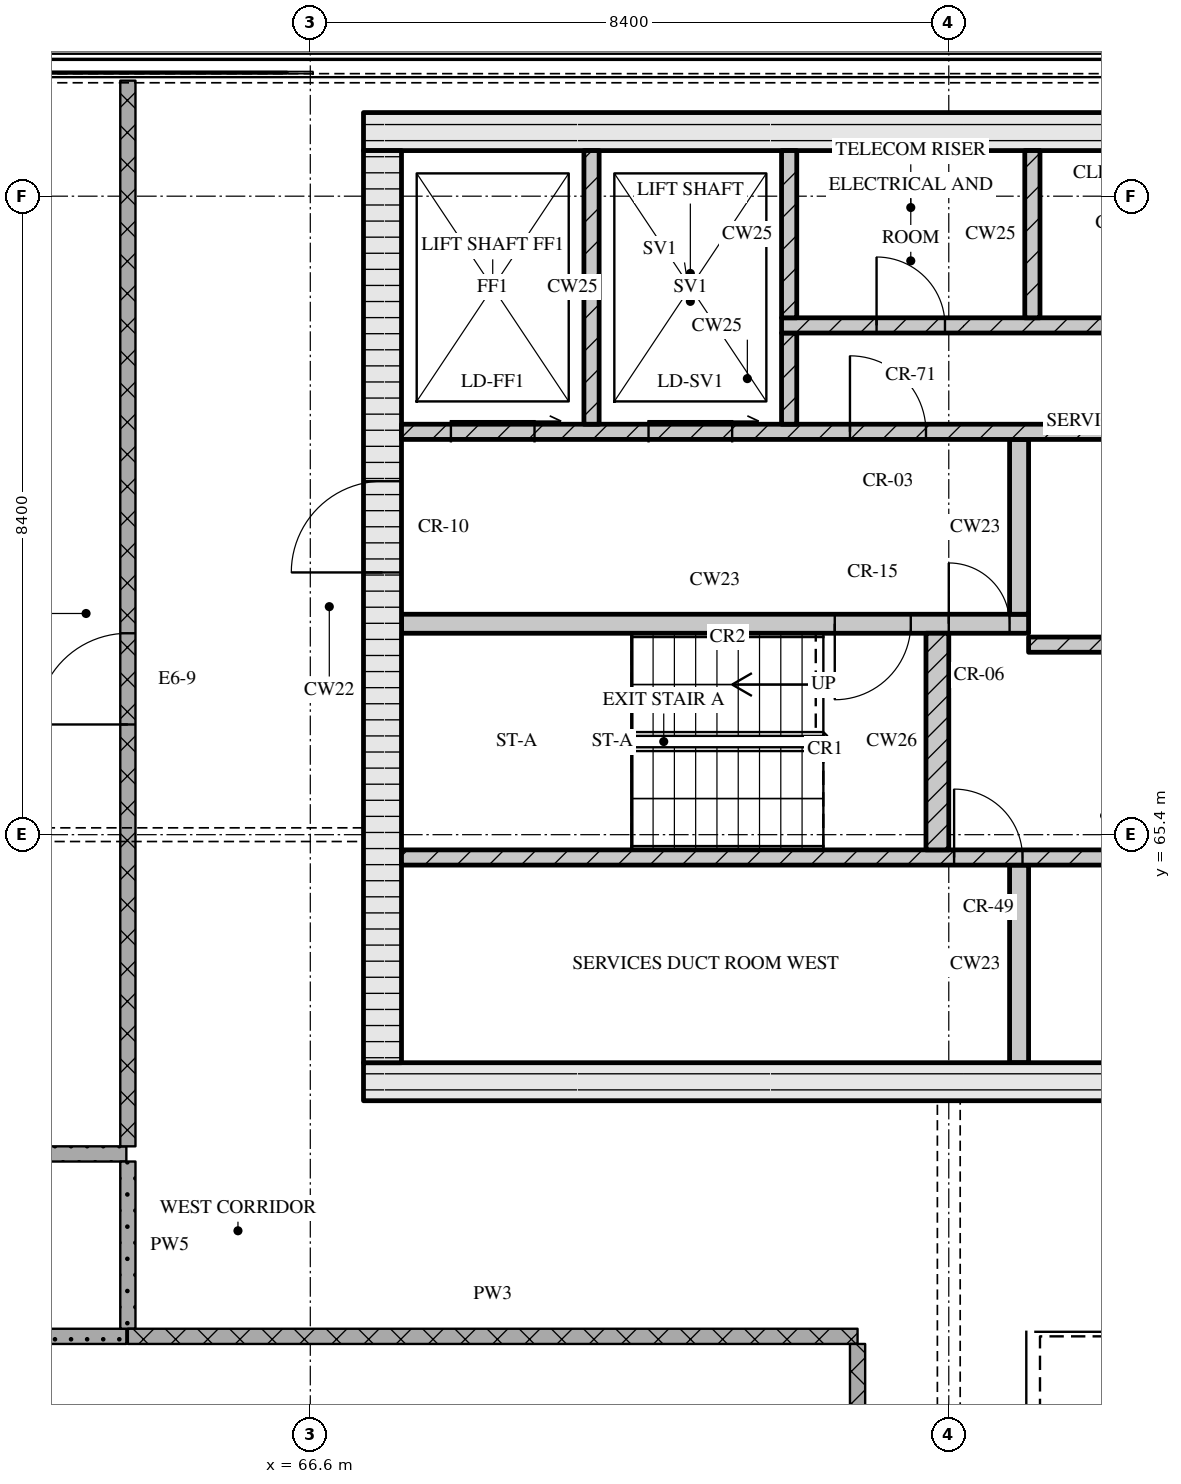
"""IFC4 building model, lengths in metres.
Left out: names, types, materials, properties, quantities, classifications, styles, units other than length and angle.
Written with IfcOpenShell. Run it as: python <this file> out.ifc"""

import sys

from ifc_helpers import new_model, si_unit, direction, frame, frame_2d, origin, place, context, subcontext, project, spatial, rectangle, extrude, element, fill, save


model = new_model("IFC4")
c1 = context("Model", 3, precision=1e-05, world=origin(), true_north=direction((0.0, 1.0)))
c2 = subcontext(c1, "Body", "Model", "MODEL_VIEW")
j1 = project(units=[si_unit("LENGTHUNIT", "METRE"), si_unit("PLANEANGLEUNIT", "RADIAN")], contexts=[c1])
p1 = place(None, origin())
s1 = spatial("IfcSite", under=j1, at=p1, CompositionType="ELEMENT")
p2 = place(p1, origin())
s2 = spatial("IfcBuilding", under=s1, at=p2, CompositionType="ELEMENT")
p3 = place(p2, frame((0.0, 0.0, 303.15)))
s3 = spatial("IfcBuildingStorey", under=s2, at=p3, CompositionType="ELEMENT", Elevation=303.15)
p4 = place(p3, frame((67.3, 62.15, 0.0), z_axis=(0.0, 0.0, 1.0), x_axis=(1.0, 0.0, 0.0)))
e1 = element("IfcWall", 1, at=p4, inside=s3, PredefinedType="SOLIDWALL", context=c2, shape_type="SweptSolid", body=[
    extrude(rectangle(XDim=40.6, YDim=0.5, at=frame_2d((20.3, 0.0))), origin(), (0.0, 0.0, 1.0), 3.32),
])
p5 = place(p4, frame((20.65, 0.0, 0.0)))
e2 = element("IfcOpeningElement", 2, at=p5, cuts=e1, PredefinedType="OPENING", context=c2, shape_type="SweptSolid", body=[
    extrude(rectangle(XDim=1.8, YDim=2.1, at=frame_2d((0.9, 1.05))), frame((0.0, 0.26, 0.0), z_axis=(0.0, -1.0, 0.0), x_axis=(1.0, 0.0, 0.0)), (0.0, 0.0, 1.0), 0.52),
])
p6 = place(p3, frame((67.3, 74.65, 0.0), z_axis=(0.0, 0.0, 1.0), x_axis=(1.0, 0.0, 0.0)))
e3 = element("IfcWall", 3, at=p6, inside=s3, PredefinedType="SOLIDWALL", context=c2, shape_type="SweptSolid", body=[
    extrude(rectangle(XDim=40.6, YDim=0.5, at=frame_2d((20.3, 0.0))), origin(), (0.0, 0.0, 1.0), 3.32),
])
p7 = place(p3, frame((67.55, 62.4, 0.0), z_axis=(0.0, 0.0, 1.0), x_axis=(0.0, 1.0, 0.0)))
e4 = element("IfcWall", 4, at=p7, inside=s3, PredefinedType="SOLIDWALL", context=c2, shape_type="SweptSolid", body=[
    extrude(rectangle(XDim=12.0, YDim=0.5, at=frame_2d((6.0, 0.0))), origin(), (0.0, 0.0, 1.0), 3.32),
])
p8 = place(p7, frame((6.45, 0.0, 0.0)))
e5 = element("IfcOpeningElement", 5, at=p8, cuts=e4, PredefinedType="OPENING", context=c2, shape_type="SweptSolid", body=[
    extrude(rectangle(XDim=1.2, YDim=2.1, at=frame_2d((0.6, 1.05))), frame((0.0, 0.26, 0.0), z_axis=(0.0, -1.0, 0.0), x_axis=(1.0, 0.0, 0.0)), (0.0, 0.0, 1.0), 0.52),
])
p9 = place(p3, frame((75.925, 62.4, 0.0), z_axis=(0.0, 0.0, 1.0), x_axis=(0.0, 1.0, 0.0)))
e6 = element("IfcWall", 6, at=p9, inside=s3, PredefinedType="SOLIDWALL", context=c2, shape_type="SweptSolid", body=[
    extrude(rectangle(XDim=2.6, YDim=0.25, at=frame_2d((1.3, 0.0))), origin(), (0.0, 0.0, 1.0), 3.32),
])
p10 = place(p3, frame((67.8, 65.1, 0.0), z_axis=(0.0, 0.0, 1.0), x_axis=(1.0, 0.0, 0.0)))
e7 = element("IfcWall", 7, at=p10, inside=s3, PredefinedType="SOLIDWALL", context=c2, shape_type="SweptSolid", body=[
    extrude(rectangle(XDim=18.5, YDim=0.2, at=frame_2d((9.25, 0.0))), origin(), (0.0, 0.0, 1.0), 3.32),
])
p11 = place(p10, frame((7.27, 0.0, 0.0)))
e8 = element("IfcOpeningElement", 8, at=p11, cuts=e7, PredefinedType="OPENING", context=c2, shape_type="SweptSolid", body=[
    extrude(rectangle(XDim=0.9, YDim=2.1, at=frame_2d((0.45, 1.05))), frame((0.0, 0.11, 0.0), z_axis=(0.0, -1.0, 0.0), x_axis=(1.0, 0.0, 0.0)), (0.0, 0.0, 1.0), 0.22),
])
p12 = place(p10, frame((11.45, 0.0, 0.0)))
e9 = element("IfcOpeningElement", 9, at=p12, cuts=e7, PredefinedType="OPENING", context=c2, shape_type="SweptSolid", body=[
    extrude(rectangle(XDim=0.9, YDim=2.1, at=frame_2d((0.45, 1.05))), frame((0.0, 0.11, 0.0), z_axis=(0.0, -1.0, 0.0), x_axis=(1.0, 0.0, 0.0)), (0.0, 0.0, 1.0), 0.22),
])
p13 = place(p10, frame((16.7, 0.0, 0.0)))
e10 = element("IfcOpeningElement", 10, at=p13, cuts=e7, PredefinedType="OPENING", context=c2, shape_type="SweptSolid", body=[
    extrude(rectangle(XDim=0.9, YDim=2.1, at=frame_2d((0.45, 1.05))), frame((0.0, 0.11, 0.0), z_axis=(0.0, -1.0, 0.0), x_axis=(1.0, 0.0, 0.0)), (0.0, 0.0, 1.0), 0.22),
])
p14 = place(p3, frame((74.85, 65.2, 0.0), z_axis=(0.0, 0.0, 1.0), x_axis=(0.0, 1.0, 0.0)))
e11 = element("IfcWall", 11, at=p14, inside=s3, PredefinedType="SOLIDWALL", context=c2, shape_type="SweptSolid", body=[
    extrude(rectangle(XDim=2.85, YDim=0.3, at=frame_2d((1.425, 0.0))), origin(), (0.0, 0.0, 1.0), 3.32),
])
p15 = place(p3, frame((76.05, 67.9, 0.0), z_axis=(0.0, 0.0, 1.0), x_axis=(1.0, 0.0, 0.0)))
e12 = element("IfcWall", 12, at=p15, inside=s3, PredefinedType="SOLIDWALL", context=c2, shape_type="SweptSolid", body=[
    extrude(rectangle(XDim=23.1, YDim=0.2, at=frame_2d((11.55, 0.0))), origin(), (0.0, 0.0, 1.0), 3.32),
])
p16 = place(p15, frame((1.4, 0.0, 0.0)))
e13 = element("IfcOpeningElement", 13, at=p16, cuts=e12, PredefinedType="OPENING", context=c2, shape_type="SweptSolid", body=[
    extrude(rectangle(XDim=0.9, YDim=2.1, at=frame_2d((0.45, 1.05))), frame((0.0, 0.11, 0.0), z_axis=(0.0, -1.0, 0.0), x_axis=(1.0, 0.0, 0.0)), (0.0, 0.0, 1.0), 0.22),
])
p17 = place(p15, frame((5.11, 0.0, 0.0)))
e14 = element("IfcOpeningElement", 14, at=p17, cuts=e12, PredefinedType="OPENING", context=c2, shape_type="SweptSolid", body=[
    extrude(rectangle(XDim=0.9, YDim=2.1, at=frame_2d((0.45, 1.05))), frame((0.0, 0.11, 0.0), z_axis=(0.0, -1.0, 0.0), x_axis=(1.0, 0.0, 0.0)), (0.0, 0.0, 1.0), 0.22),
])
p18 = place(p15, frame((8.45, 0.0, 0.0)))
e15 = element("IfcOpeningElement", 15, at=p18, cuts=e12, PredefinedType="OPENING", context=c2, shape_type="SweptSolid", body=[
    extrude(rectangle(XDim=0.9, YDim=2.1, at=frame_2d((0.45, 1.05))), frame((0.0, 0.11, 0.0), z_axis=(0.0, -1.0, 0.0), x_axis=(1.0, 0.0, 0.0)), (0.0, 0.0, 1.0), 0.22),
])
p19 = place(p15, frame((10.91, 0.0, 0.0)))
e16 = element("IfcOpeningElement", 16, at=p19, cuts=e12, PredefinedType="OPENING", context=c2, shape_type="SweptSolid", body=[
    extrude(rectangle(XDim=0.9, YDim=2.1, at=frame_2d((0.45, 1.05))), frame((0.0, 0.11, 0.0), z_axis=(0.0, -1.0, 0.0), x_axis=(1.0, 0.0, 0.0)), (0.0, 0.0, 1.0), 0.22),
])
p20 = place(p15, frame((13.55, 0.0, 0.0)))
e17 = element("IfcOpeningElement", 17, at=p20, cuts=e12, PredefinedType="OPENING", context=c2, shape_type="SweptSolid", body=[
    extrude(rectangle(XDim=1.0, YDim=2.1, at=frame_2d((0.5, 1.05))), frame((0.0, 0.11, 0.0), z_axis=(0.0, -1.0, 0.0), x_axis=(1.0, 0.0, 0.0)), (0.0, 0.0, 1.0), 0.22),
])
p21 = place(p15, frame((16.2, 0.0, 0.0)))
e18 = element("IfcOpeningElement", 18, at=p21, cuts=e12, PredefinedType="OPENING", context=c2, shape_type="SweptSolid", body=[
    extrude(rectangle(XDim=1.1, YDim=2.1, at=frame_2d((0.55, 1.05))), frame((0.0, 0.11, 0.0), z_axis=(0.0, -1.0, 0.0), x_axis=(1.0, 0.0, 0.0)), (0.0, 0.0, 1.0), 0.22),
])
p22 = place(p15, frame((18.7, 0.0, 0.0)))
e19 = element("IfcOpeningElement", 19, at=p22, cuts=e12, PredefinedType="OPENING", context=c2, shape_type="SweptSolid", body=[
    extrude(rectangle(XDim=1.1, YDim=2.1, at=frame_2d((0.55, 1.05))), frame((0.0, 0.11, 0.0), z_axis=(0.0, -1.0, 0.0), x_axis=(1.0, 0.0, 0.0)), (0.0, 0.0, 1.0), 0.22),
])
p23 = place(p15, frame((21.2, 0.0, 0.0)))
e20 = element("IfcOpeningElement", 20, at=p23, cuts=e12, PredefinedType="OPENING", context=c2, shape_type="SweptSolid", body=[
    extrude(rectangle(XDim=1.1, YDim=2.1, at=frame_2d((0.55, 1.05))), frame((0.0, 0.11, 0.0), z_axis=(0.0, -1.0, 0.0), x_axis=(1.0, 0.0, 0.0)), (0.0, 0.0, 1.0), 0.22),
])
p24 = place(p3, frame((67.8, 68.175, 0.0), z_axis=(0.0, 0.0, 1.0), x_axis=(1.0, 0.0, 0.0)))
e21 = element("IfcWall", 21, at=p24, inside=s3, PredefinedType="SOLIDWALL", context=c2, shape_type="SweptSolid", body=[
    extrude(rectangle(XDim=8.25, YDim=0.25, at=frame_2d((4.125, 0.0))), origin(), (0.0, 0.0, 1.0), 3.32),
])
p25 = place(p24, frame((5.7, 0.0, 0.0)))
e22 = element("IfcOpeningElement", 22, at=p25, cuts=e21, PredefinedType="OPENING", context=c2, shape_type="SweptSolid", body=[
    extrude(rectangle(XDim=1.0, YDim=2.1, at=frame_2d((0.5, 1.05))), frame((0.0, 0.135, 0.0), z_axis=(0.0, -1.0, 0.0), x_axis=(1.0, 0.0, 0.0)), (0.0, 0.0, 1.0), 0.27),
])
p26 = place(p24, frame((7.2, 0.0, 0.0)))
e23 = element("IfcOpeningElement", 23, at=p26, cuts=e21, PredefinedType="OPENING", context=c2, shape_type="SweptSolid", body=[
    extrude(rectangle(XDim=0.8, YDim=2.1, at=frame_2d((0.4, 1.05))), frame((0.0, 0.135, 0.0), z_axis=(0.0, -1.0, 0.0), x_axis=(1.0, 0.0, 0.0)), (0.0, 0.0, 1.0), 0.27),
])
p27 = place(p3, frame((75.925, 68.3, 0.0), z_axis=(0.0, 0.0, 1.0), x_axis=(0.0, 1.0, 0.0)))
e24 = element("IfcWall", 24, at=p27, inside=s3, PredefinedType="SOLIDWALL", context=c2, shape_type="SweptSolid", body=[
    extrude(rectangle(XDim=2.3, YDim=0.25, at=frame_2d((1.15, 0.0))), origin(), (0.0, 0.0, 1.0), 3.32),
])
p28 = place(p3, frame((67.8, 70.7, 0.0), z_axis=(0.0, 0.0, 1.0), x_axis=(1.0, 0.0, 0.0)))
e25 = element("IfcWall", 25, at=p28, inside=s3, PredefinedType="SOLIDWALL", context=c2, shape_type="SweptSolid", body=[
    extrude(rectangle(XDim=39.6, YDim=0.2, at=frame_2d((19.8, 0.0))), origin(), (0.0, 0.0, 1.0), 3.32),
])
p29 = place(p28, frame((0.65, 0.0, 0.0)))
e26 = element("IfcOpeningElement", 26, at=p29, cuts=e25, PredefinedType="OPENING", context=c2, shape_type="SweptSolid", body=[
    extrude(rectangle(XDim=1.1, YDim=2.1, at=frame_2d((0.55, 1.05))), frame((0.0, 0.11, 0.0), z_axis=(0.0, -1.0, 0.0), x_axis=(1.0, 0.0, 0.0)), (0.0, 0.0, 1.0), 0.22),
])
p30 = place(p28, frame((3.25, 0.0, 0.0)))
e27 = element("IfcOpeningElement", 27, at=p30, cuts=e25, PredefinedType="OPENING", context=c2, shape_type="SweptSolid", body=[
    extrude(rectangle(XDim=1.1, YDim=2.1, at=frame_2d((0.55, 1.05))), frame((0.0, 0.11, 0.0), z_axis=(0.0, -1.0, 0.0), x_axis=(1.0, 0.0, 0.0)), (0.0, 0.0, 1.0), 0.22),
])
p31 = place(p28, frame((5.9, 0.0, 0.0)))
e28 = element("IfcOpeningElement", 28, at=p31, cuts=e25, PredefinedType="OPENING", context=c2, shape_type="SweptSolid", body=[
    extrude(rectangle(XDim=1.0, YDim=2.1, at=frame_2d((0.5, 1.05))), frame((0.0, 0.11, 0.0), z_axis=(0.0, -1.0, 0.0), x_axis=(1.0, 0.0, 0.0)), (0.0, 0.0, 1.0), 0.22),
])
p32 = place(p28, frame((21.7, 0.0, 0.0)))
e29 = element("IfcOpeningElement", 29, at=p32, cuts=e25, PredefinedType="OPENING", context=c2, shape_type="SweptSolid", body=[
    extrude(rectangle(XDim=1.0, YDim=2.1, at=frame_2d((0.5, 1.05))), frame((0.0, 0.11, 0.0), z_axis=(0.0, -1.0, 0.0), x_axis=(1.0, 0.0, 0.0)), (0.0, 0.0, 1.0), 0.22),
])
p33 = place(p28, frame((32.7, 0.0, 0.0)))
e30 = element("IfcOpeningElement", 30, at=p33, cuts=e25, PredefinedType="OPENING", context=c2, shape_type="SweptSolid", body=[
    extrude(rectangle(XDim=1.0, YDim=2.1, at=frame_2d((0.5, 1.05))), frame((0.0, 0.11, 0.0), z_axis=(0.0, -1.0, 0.0), x_axis=(1.0, 0.0, 0.0)), (0.0, 0.0, 1.0), 0.22),
])
p34 = place(p28, frame((35.25, 0.0, 0.0)))
e31 = element("IfcOpeningElement", 31, at=p34, cuts=e25, PredefinedType="OPENING", context=c2, shape_type="SweptSolid", body=[
    extrude(rectangle(XDim=1.1, YDim=2.1, at=frame_2d((0.55, 1.05))), frame((0.0, 0.11, 0.0), z_axis=(0.0, -1.0, 0.0), x_axis=(1.0, 0.0, 0.0)), (0.0, 0.0, 1.0), 0.22),
])
p35 = place(p28, frame((37.85, 0.0, 0.0)))
e32 = element("IfcOpeningElement", 32, at=p35, cuts=e25, PredefinedType="OPENING", context=c2, shape_type="SweptSolid", body=[
    extrude(rectangle(XDim=1.1, YDim=2.1, at=frame_2d((0.55, 1.05))), frame((0.0, 0.11, 0.0), z_axis=(0.0, -1.0, 0.0), x_axis=(1.0, 0.0, 0.0)), (0.0, 0.0, 1.0), 0.22),
])
p36 = place(p3, frame((70.3, 70.8, 0.0), z_axis=(0.0, 0.0, 1.0), x_axis=(0.0, 1.0, 0.0)))
e33 = element("IfcWall", 33, at=p36, inside=s3, PredefinedType="SOLIDWALL", context=c2, shape_type="SweptSolid", body=[
    extrude(rectangle(XDim=3.6, YDim=0.2, at=frame_2d((1.8, 0.0))), origin(), (0.0, 0.0, 1.0), 3.32),
])
p37 = place(p3, frame((72.9, 70.8, 0.0), z_axis=(0.0, 0.0, 1.0), x_axis=(0.0, 1.0, 0.0)))
e34 = element("IfcWall", 34, at=p37, inside=s3, PredefinedType="SOLIDWALL", context=c2, shape_type="SweptSolid", body=[
    extrude(rectangle(XDim=1.2, YDim=0.2, at=frame_2d((0.6, 0.0))), origin(), (0.0, 0.0, 1.0), 3.32),
])
p38 = place(p3, frame((72.8, 72.1, 0.0), z_axis=(0.0, 0.0, 1.0), x_axis=(1.0, 0.0, 0.0)))
e35 = element("IfcWall", 35, at=p38, inside=s3, PredefinedType="SOLIDWALL", context=c2, shape_type="SweptSolid", body=[
    extrude(rectangle(XDim=8.92, YDim=0.2, at=frame_2d((4.46, 0.0))), origin(), (0.0, 0.0, 1.0), 3.32),
])
p39 = place(p38, frame((1.25, 0.0, 0.0)))
e36 = element("IfcOpeningElement", 36, at=p39, cuts=e35, PredefinedType="OPENING", context=c2, shape_type="SweptSolid", body=[
    extrude(rectangle(XDim=0.9, YDim=2.1, at=frame_2d((0.45, 1.05))), frame((0.0, 0.11, 0.0), z_axis=(0.0, -1.0, 0.0), x_axis=(1.0, 0.0, 0.0)), (0.0, 0.0, 1.0), 0.22),
])
p40 = place(p38, frame((4.45, 0.0, 0.0)))
e37 = element("IfcOpeningElement", 37, at=p40, cuts=e35, PredefinedType="OPENING", context=c2, shape_type="SweptSolid", body=[
    extrude(rectangle(XDim=0.9, YDim=2.1, at=frame_2d((0.45, 1.05))), frame((0.0, 0.11, 0.0), z_axis=(0.0, -1.0, 0.0), x_axis=(1.0, 0.0, 0.0)), (0.0, 0.0, 1.0), 0.22),
])
p41 = place(p38, frame((7.21, 0.0, 0.0)))
e38 = element("IfcOpeningElement", 38, at=p41, cuts=e35, PredefinedType="OPENING", context=c2, shape_type="SweptSolid", body=[
    extrude(rectangle(XDim=0.9, YDim=2.1, at=frame_2d((0.45, 1.05))), frame((0.0, 0.11, 0.0), z_axis=(0.0, -1.0, 0.0), x_axis=(1.0, 0.0, 0.0)), (0.0, 0.0, 1.0), 0.22),
])
for number, where, z_axis, x_axis in (
    (39, (72.9, 72.2, 0.0), (0.0, 0.0, 1.0), (0.0, 1.0, 0.0)),
    (40, (76.1, 72.2, 0.0), (0.0, 0.0, 1.0), (0.0, 1.0, 0.0)),
):
    element("IfcWall", number, at=place(p3, frame(where, z_axis=z_axis, x_axis=x_axis)), inside=s3, PredefinedType="SOLIDWALL", context=c2, shape_type="SweptSolid", body=[
        extrude(rectangle(XDim=2.2, YDim=0.2, at=frame_2d((1.1, 0.0))), origin(), (0.0, 0.0, 1.0), 3.32),
    ])
p42 = place(p3, frame((64.2, 58.8, 0.0), z_axis=(0.0, 0.0, 1.0), x_axis=(1.0, 0.0, 0.0)))
e41 = element("IfcWall", 41, at=p42, inside=s3, PredefinedType="PARTITIONING", context=c2, shape_type="SweptSolid", body=[
    extrude(rectangle(XDim=9.6, YDim=0.2, at=frame_2d((4.8, 0.0))), origin(), (0.0, 0.0, 1.0), 3.32),
])
for number, where, z_axis, x_axis in (
    (42, (56.7, 58.8, 0.0), (0.0, 0.0, 1.0), (1.0, 0.0, 0.0)),
    (43, (56.7, 61.2, 0.0), (0.0, 0.0, 1.0), (1.0, 0.0, 0.0)),
):
    element("IfcWall", number, at=place(p3, frame(where, z_axis=z_axis, x_axis=x_axis)), inside=s3, PredefinedType="PARTITIONING", context=c2, shape_type="SweptSolid", body=[
        extrude(rectangle(XDim=7.48, YDim=0.2, at=frame_2d((3.74, 0.0))), origin(), (0.0, 0.0, 1.0), 3.32),
    ])
p43 = place(p3, frame((64.2, 61.3, 0.0), z_axis=(0.0, 0.0, 1.0), x_axis=(0.0, 1.0, 0.0)))
e44 = element("IfcWall", 44, at=p43, inside=s3, PredefinedType="PARTITIONING", context=c2, shape_type="SweptSolid", body=[
    extrude(rectangle(XDim=14.02, YDim=0.2, at=frame_2d((7.01, 0.0))), origin(), (0.0, 0.0, 1.0), 3.32),
])
p44 = place(p43, frame((5.55, 0.0, 0.0)))
e45 = element("IfcOpeningElement", 45, at=p44, cuts=e44, PredefinedType="OPENING", context=c2, shape_type="SweptSolid", body=[
    extrude(rectangle(XDim=1.2, YDim=2.1, at=frame_2d((0.6, 1.05))), frame((0.0, 0.11, 0.0), z_axis=(0.0, -1.0, 0.0), x_axis=(1.0, 0.0, 0.0)), (0.0, 0.0, 1.0), 0.22),
])
p45 = place(p3, frame((64.2, 61.1, 0.0), z_axis=(0.0, 0.0, 1.0), x_axis=(0.0, -1.0, 0.0)))
e46 = element("IfcWall", 46, at=p45, inside=s3, PredefinedType="PARTITIONING", context=c2, shape_type="SweptSolid", body=[
    extrude(rectangle(XDim=2.2, YDim=0.2, at=frame_2d((1.1, 0.0))), origin(), (0.0, 0.0, 1.0), 3.32),
])
p46 = place(p3, frame((73.8, 50.7, 0.0), z_axis=(0.0, 0.0, 1.0), x_axis=(0.0, 1.0, 0.0)))
e47 = element("IfcWall", 47, at=p46, inside=s3, PredefinedType="PARTITIONING", context=c2, shape_type="SweptSolid", body=[
    extrude(rectangle(XDim=8.0, YDim=0.2, at=frame_2d((4.0, 0.0))), origin(), (0.0, 0.0, 1.0), 3.32),
])
p47 = place(p46, frame((4.35, 0.0, 0.0)))
e48 = element("IfcOpeningElement", 48, at=p47, cuts=e47, PredefinedType="OPENING", context=c2, shape_type="SweptSolid", body=[
    extrude(rectangle(XDim=1.2, YDim=2.1, at=frame_2d((0.6, 1.05))), frame((0.0, 0.11, 0.0), z_axis=(0.0, -1.0, 0.0), x_axis=(1.0, 0.0, 0.0)), (0.0, 0.0, 1.0), 0.22),
])
p48 = place(p11, origin())
e49 = element("IfcDoor", 49, at=p48, inside=s3, OperationType="SINGLE_SWING_LEFT", PredefinedType="DOOR", context=c2, shape_type="SweptSolid", body=[
    extrude(rectangle(XDim=0.9, YDim=2.1, at=frame_2d((0.45, 1.05))), frame((0.0, 0.025, 0.0), z_axis=(0.0, -1.0, 0.0), x_axis=(1.0, 0.0, 0.0)), (0.0, 0.0, 1.0), 0.05),
])
fill(e8, e49)
p49 = place(p25, origin())
e50 = element("IfcDoor", 50, at=p49, inside=s3, OperationType="SINGLE_SWING_RIGHT", PredefinedType="DOOR", context=c2, shape_type="SweptSolid", body=[
    extrude(rectangle(XDim=1.0, YDim=2.1, at=frame_2d((0.5, 1.05))), frame((0.0, 0.025, 0.0), z_axis=(0.0, -1.0, 0.0), x_axis=(1.0, 0.0, 0.0)), (0.0, 0.0, 1.0), 0.05),
])
fill(e22, e50)
p50 = place(p26, origin())
e51 = element("IfcDoor", 51, at=p50, inside=s3, OperationType="SINGLE_SWING_LEFT", PredefinedType="DOOR", context=c2, shape_type="SweptSolid", body=[
    extrude(rectangle(XDim=0.8, YDim=2.1, at=frame_2d((0.4, 1.05))), frame((0.0, 0.025, 0.0), z_axis=(0.0, -1.0, 0.0), x_axis=(1.0, 0.0, 0.0)), (0.0, 0.0, 1.0), 0.05),
])
fill(e23, e51)
p51 = place(p8, origin())
e52 = element("IfcDoor", 52, at=p51, inside=s3, OperationType="SINGLE_SWING_LEFT", PredefinedType="DOOR", context=c2, shape_type="SweptSolid", body=[
    extrude(rectangle(XDim=1.2, YDim=2.1, at=frame_2d((0.6, 1.05))), frame((0.0, 0.025, 0.0), z_axis=(0.0, -1.0, 0.0), x_axis=(1.0, 0.0, 0.0)), (0.0, 0.0, 1.0), 0.05),
])
fill(e5, e52)
p52 = place(p29, origin())
e53 = element("IfcDoor", 53, at=p52, inside=s3, OperationType="SLIDING_TO_RIGHT", PredefinedType="DOOR", context=c2, shape_type="SweptSolid", body=[
    extrude(rectangle(XDim=1.1, YDim=2.1, at=frame_2d((0.55, 1.05))), frame((0.0, 0.025, 0.0), z_axis=(0.0, -1.0, 0.0), x_axis=(1.0, 0.0, 0.0)), (0.0, 0.0, 1.0), 0.05),
])
fill(e26, e53)
p53 = place(p30, origin())
e54 = element("IfcDoor", 54, at=p53, inside=s3, OperationType="SLIDING_TO_RIGHT", PredefinedType="DOOR", context=c2, shape_type="SweptSolid", body=[
    extrude(rectangle(XDim=1.1, YDim=2.1, at=frame_2d((0.55, 1.05))), frame((0.0, 0.025, 0.0), z_axis=(0.0, -1.0, 0.0), x_axis=(1.0, 0.0, 0.0)), (0.0, 0.0, 1.0), 0.05),
])
fill(e27, e54)
p54 = place(p31, origin())
e55 = element("IfcDoor", 55, at=p54, inside=s3, OperationType="SINGLE_SWING_LEFT", PredefinedType="DOOR", context=c2, shape_type="SweptSolid", body=[
    extrude(rectangle(XDim=1.0, YDim=2.1, at=frame_2d((0.5, 1.05))), frame((0.0, 0.025, 0.0), z_axis=(0.0, -1.0, 0.0), x_axis=(1.0, 0.0, 0.0)), (0.0, 0.0, 1.0), 0.05),
])
fill(e28, e55)
p55 = place(p39, origin())
e56 = element("IfcDoor", 56, at=p55, inside=s3, OperationType="SINGLE_SWING_LEFT", PredefinedType="DOOR", context=c2, shape_type="SweptSolid", body=[
    extrude(rectangle(XDim=0.9, YDim=2.1, at=frame_2d((0.45, 1.05))), frame((0.0, 0.025, 0.0), z_axis=(0.0, -1.0, 0.0), x_axis=(1.0, 0.0, 0.0)), (0.0, 0.0, 1.0), 0.05),
])
fill(e36, e56)
p56 = place(p44, origin())
e57 = element("IfcDoor", 57, at=p56, inside=s3, OperationType="SINGLE_SWING_LEFT", PredefinedType="DOOR", context=c2, shape_type="SweptSolid", body=[
    extrude(rectangle(XDim=1.2, YDim=2.1, at=frame_2d((0.6, 1.05))), frame((0.0, 0.025, 0.0), z_axis=(0.0, -1.0, 0.0), x_axis=(1.0, 0.0, 0.0)), (0.0, 0.0, 1.0), 0.05),
])
fill(e45, e57)
save(model, sys.argv[1])
